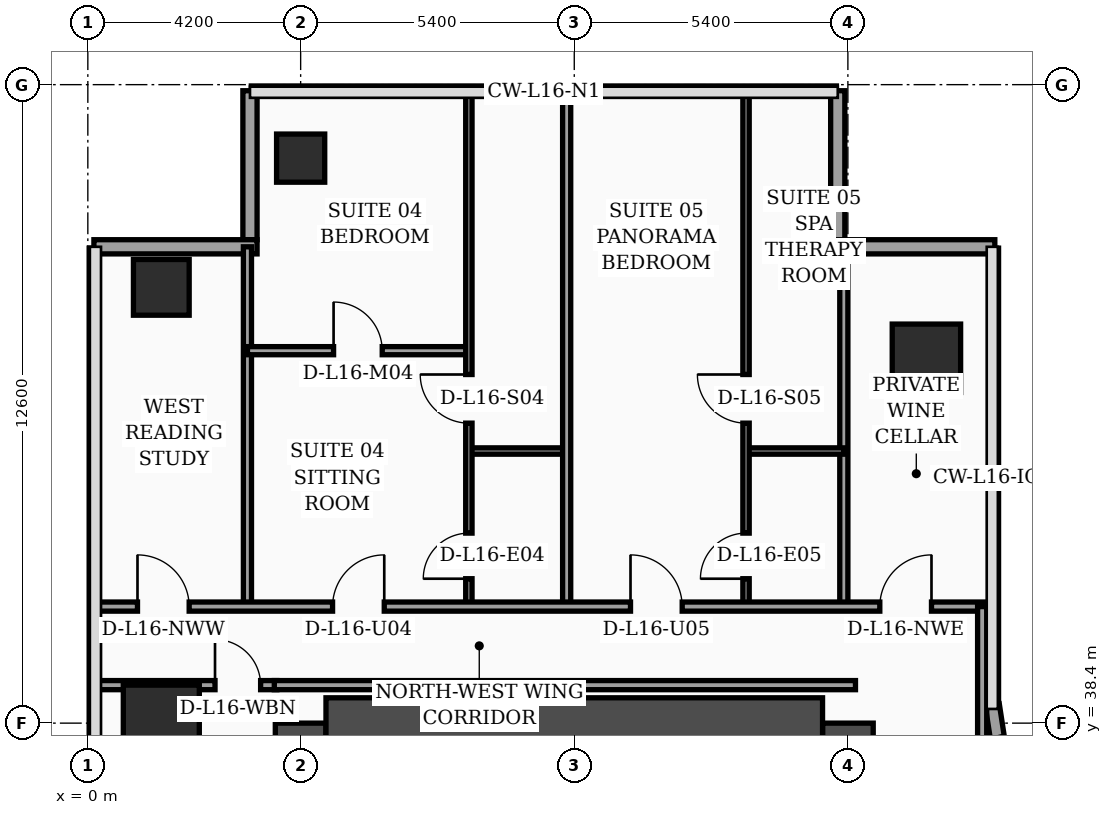
"""IFC4 building model, lengths in metres.
Left out: names, types, materials, properties, quantities, classifications, styles, units other than length and angle.
Written with IfcOpenShell. Run it as: python <this file> out.ifc"""

import sys

from ifc_helpers import new_model, si_unit, direction, frame, frame_2d, origin, origin_2d, place, context, subcontext, project, spatial, rectangle, hollow_rectangle, extrude, element, fill, save


model = new_model("IFC4")
c1 = context("Model", 3, precision=1e-05, world=origin(), true_north=direction((0.0, 1.0)))
c2 = subcontext(c1, "Body", "Model", "MODEL_VIEW")
j1 = project(units=[si_unit("LENGTHUNIT", "METRE"), si_unit("PLANEANGLEUNIT", "RADIAN")], contexts=[c1])
p1 = place(None, origin())
s1 = spatial("IfcSite", under=j1, at=p1, CompositionType="ELEMENT")
p2 = place(p1, origin())
s2 = spatial("IfcBuilding", under=s1, at=p2, CompositionType="ELEMENT")
p3 = place(p2, frame((0.0, 0.0, 69.8)))
s3 = spatial("IfcBuildingStorey", under=s2, at=p3, CompositionType="ELEMENT", Elevation=69.8)
p4 = place(p3, frame((4.2, 16.8, 0.0), z_axis=(0.0, 0.0, 1.0), x_axis=(0.0, 1.0, 0.0)))
e1 = element("IfcWall", 1, at=p4, inside=s3, PredefinedType="SHEAR", context=c2, shape_type="SweptSolid", body=[
    extrude(rectangle(XDim=21.6, YDim=1.0, at=frame_2d((10.8, 0.0))), origin(), (0.0, 0.0, 1.0), 3.56),
])
p5 = place(p3, frame((15.0, 16.8, 0.0), z_axis=(0.0, 0.0, 1.0), x_axis=(0.0, 1.0, 0.0)))
e2 = element("IfcWall", 2, at=p5, inside=s3, PredefinedType="SHEAR", context=c2, shape_type="SweptSolid", body=[
    extrude(rectangle(XDim=21.6, YDim=1.0, at=frame_2d((10.8, 0.0))), origin(), (0.0, 0.0, 1.0), 3.56),
])
p6 = place(p5, frame((8.65, 0.0, 0.0)))
e3 = element("IfcOpeningElement", 3, at=p6, cuts=e2, PredefinedType="OPENING", context=c2, shape_type="SweptSolid", body=[
    extrude(rectangle(XDim=1.1, YDim=2.2, at=frame_2d((0.55, 1.1))), frame((0.0, 0.51, 0.0), z_axis=(0.0, -1.0, 0.0), x_axis=(1.0, 0.0, 0.0)), (0.0, 0.0, 1.0), 1.02),
])
p7 = place(p5, frame((1.25, 0.0, 0.0)))
e4 = element("IfcOpeningElement", 4, at=p7, cuts=e2, PredefinedType="OPENING", context=c2, shape_type="SweptSolid", body=[
    extrude(rectangle(XDim=1.1, YDim=2.2, at=frame_2d((0.55, 1.1))), frame((0.0, 0.51, 0.0), z_axis=(0.0, -1.0, 0.0), x_axis=(1.0, 0.0, 0.0)), (0.0, 0.0, 1.0), 1.02),
])
p8 = place(p5, frame((3.8, 0.0, 0.0)))
e5 = element("IfcOpeningElement", 5, at=p8, cuts=e2, PredefinedType="OPENING", context=c2, shape_type="SweptSolid", body=[
    extrude(rectangle(XDim=1.1, YDim=2.2, at=frame_2d((0.55, 1.1))), frame((0.0, 0.51, 0.0), z_axis=(0.0, -1.0, 0.0), x_axis=(1.0, 0.0, 0.0)), (0.0, 0.0, 1.0), 1.02),
])
p9 = place(p5, frame((6.35, 0.0, 0.0)))
e6 = element("IfcOpeningElement", 6, at=p9, cuts=e2, PredefinedType="OPENING", context=c2, shape_type="SweptSolid", body=[
    extrude(rectangle(XDim=1.1, YDim=2.2, at=frame_2d((0.55, 1.1))), frame((0.0, 0.51, 0.0), z_axis=(0.0, -1.0, 0.0), x_axis=(1.0, 0.0, 0.0)), (0.0, 0.0, 1.0), 1.02),
])
p10 = place(p3, frame((4.7, 38.4, 0.0), z_axis=(0.0, 0.0, 1.0), x_axis=(1.0, 0.0, 0.0)))
e7 = element("IfcWall", 7, at=p10, inside=s3, PredefinedType="SHEAR", context=c2, shape_type="SweptSolid", body=[
    extrude(rectangle(XDim=9.8, YDim=1.0, at=frame_2d((4.9, 0.0))), origin(), (0.0, 0.0, 1.0), 3.56),
])
p11 = place(p3, frame((1.45, 38.4, 0.0), z_axis=(0.0, 0.0, 1.0), x_axis=(1.0, 0.0, 0.0)))
e8 = element("IfcColumn", 8, at=p11, inside=s3, PredefinedType="COLUMN", context=c2, shape_type="SweptSolid", body=[
    extrude(rectangle(XDim=1.5, YDim=1.5, at=origin_2d()), origin(), (0.0, 0.0, 1.0), 3.56),
])
p12 = place(p3, frame((1.45, 47.0, 0.0), z_axis=(0.0, 0.0, 1.0), x_axis=(1.0, 0.0, 0.0)))
e9 = element("IfcColumn", 9, at=p12, inside=s3, PredefinedType="COLUMN", context=c2, shape_type="SweptSolid", body=[
    extrude(hollow_rectangle(XDim=1.1, YDim=1.1, WallThickness=0.045, at=origin_2d()), origin(), (0.0, 0.0, 1.0), 3.56),
])
p13 = place(p3, frame((4.2, 49.55, 0.0), z_axis=(0.0, 0.0, 1.0), x_axis=(1.0, 0.0, 0.0)))
e10 = element("IfcColumn", 10, at=p13, inside=s3, PredefinedType="COLUMN", context=c2, shape_type="SweptSolid", body=[
    extrude(hollow_rectangle(XDim=0.95, YDim=0.95, WallThickness=0.04, at=origin_2d()), origin(), (0.0, 0.0, 1.0), 3.56),
])
p14 = place(p3, frame((16.55, 45.6, 0.0), z_axis=(0.0, 0.0, 1.0), x_axis=(1.0, 0.0, 0.0)))
e11 = element("IfcColumn", 11, at=p14, inside=s3, PredefinedType="COLUMN", context=c2, shape_type="SweptSolid", body=[
    extrude(rectangle(XDim=1.35, YDim=1.35, at=origin_2d()), origin(), (0.0, 0.0, 1.0), 3.56),
])
p15 = place(p3, frame((17.962, 38.03, 0.0), z_axis=(0.0, 0.0, 1.0), x_axis=(-0.15141125477, 0.988470855377, 0.0)))
e12 = element("IfcWall", 12, at=p15, inside=s3, PredefinedType="SOLIDWALL", context=c2, shape_type="SweptSolid", body=[
    extrude(rectangle(XDim=0.739, YDim=0.28, at=frame_2d((0.369, 0.0))), origin(), (0.0, 0.0, 1.0), 3.56),
])
p16 = place(p3, frame((17.9, 47.8, 0.0), z_axis=(0.0, 0.0, 1.0), x_axis=(-1.0, 0.0, 0.0)))
e13 = element("IfcWall", 13, at=p16, inside=s3, PredefinedType="SOLIDWALL", context=c2, shape_type="SweptSolid", body=[
    extrude(rectangle(XDim=3.24, YDim=0.28, at=frame_2d((1.62, 0.0))), origin(), (0.0, 0.0, 1.0), 3.56),
])
p17 = place(p3, frame((14.8, 47.94, 0.0), z_axis=(0.0, 0.0, 1.0), x_axis=(0.0, 1.0, 0.0)))
e14 = element("IfcWall", 14, at=p17, inside=s3, PredefinedType="SOLIDWALL", context=c2, shape_type="SweptSolid", body=[
    extrude(rectangle(XDim=2.94, YDim=0.28, at=frame_2d((1.47, 0.0))), origin(), (0.0, 0.0, 1.0), 3.56),
])
p18 = place(p3, frame((3.2, 50.88, 0.0), z_axis=(0.0, 0.0, 1.0), x_axis=(0.0, -1.0, 0.0)))
e15 = element("IfcWall", 15, at=p18, inside=s3, PredefinedType="SOLIDWALL", context=c2, shape_type="SweptSolid", body=[
    extrude(rectangle(XDim=2.94, YDim=0.28, at=frame_2d((1.47, 0.0))), origin(), (0.0, 0.0, 1.0), 3.04),
])
p19 = place(p3, frame((3.34, 47.8, 0.0), z_axis=(0.0, 0.0, 1.0), x_axis=(-1.0, 0.0, 0.0)))
e16 = element("IfcWall", 16, at=p19, inside=s3, PredefinedType="SOLIDWALL", context=c2, shape_type="SweptSolid", body=[
    extrude(rectangle(XDim=3.22, YDim=0.28, at=frame_2d((1.61, 0.0))), origin(), (0.0, 0.0, 1.0), 3.04),
])
p20 = place(p3, frame((0.08, 39.15, 0.0), z_axis=(0.0, 0.0, 1.0), x_axis=(1.0, 0.0, 0.0)))
e17 = element("IfcWall", 17, at=p20, inside=s3, PredefinedType="PARTITIONING", context=c2, shape_type="SweptSolid", body=[
    extrude(rectangle(XDim=3.65, YDim=0.18, at=frame_2d((1.825, 0.0))), origin(), (0.0, 0.0, 1.0), 2.84),
])
p21 = place(p20, frame((2.43, 0.0, 0.0)))
e18 = element("IfcOpeningElement", 18, at=p21, cuts=e17, PredefinedType="OPENING", context=c2, shape_type="SweptSolid", body=[
    extrude(rectangle(XDim=0.9, YDim=2.15, at=frame_2d((0.45, 1.075))), frame((0.0, 0.1, 0.0), z_axis=(0.0, -1.0, 0.0), x_axis=(1.0, 0.0, 0.0)), (0.0, 0.0, 1.0), 0.2),
])
p22 = place(p3, frame((3.15, 40.7, 0.0), z_axis=(0.0, 0.0, 1.0), x_axis=(0.0, 1.0, 0.0)))
e19 = element("IfcWall", 19, at=p22, inside=s3, PredefinedType="PARTITIONING", context=c2, shape_type="SweptSolid", body=[
    extrude(rectangle(XDim=7.1, YDim=0.16, at=frame_2d((3.55, 0.0))), origin(), (0.0, 0.0, 1.0), 3.14),
])
p23 = place(p3, frame((14.92, 40.7, 0.0), z_axis=(0.0, 0.0, 1.0), x_axis=(0.0, 1.0, 0.0)))
e20 = element("IfcWall", 20, at=p23, inside=s3, PredefinedType="PARTITIONING", context=c2, shape_type="SweptSolid", body=[
    extrude(rectangle(XDim=7.1, YDim=0.16, at=frame_2d((3.55, 0.0))), origin(), (0.0, 0.0, 1.0), 3.04),
])
p24 = place(p3, frame((7.52, 43.77, 0.0), z_axis=(0.0, 0.0, 1.0), x_axis=(1.0, 0.0, 0.0)))
e21 = element("IfcWall", 21, at=p24, inside=s3, PredefinedType="PARTITIONING", context=c2, shape_type="SweptSolid", body=[
    extrude(rectangle(XDim=1.93, YDim=0.125, at=frame_2d((0.965, 0.0))), origin(), (0.0, 0.0, 1.0), 3.56),
])
p25 = place(p3, frame((3.15, 45.75, 0.0), z_axis=(0.0, 0.0, 1.0), x_axis=(1.0, 0.0, 0.0)))
e22 = element("IfcWall", 22, at=p25, inside=s3, PredefinedType="PARTITIONING", context=c2, shape_type="SweptSolid", body=[
    extrude(rectangle(XDim=4.37, YDim=0.16, at=frame_2d((2.185, 0.0))), origin(), (0.0, 0.0, 1.0), 2.84),
])
p26 = place(p25, frame((1.7, 0.0, 0.0)))
e23 = element("IfcOpeningElement", 23, at=p26, cuts=e22, PredefinedType="OPENING", context=c2, shape_type="SweptSolid", body=[
    extrude(rectangle(XDim=0.96, YDim=2.2, at=frame_2d((0.48, 1.1))), frame((0.0, 0.09, 0.0), z_axis=(0.0, -1.0, 0.0), x_axis=(1.0, 0.0, 0.0)), (0.0, 0.0, 1.0), 0.18),
])
p27 = place(p3, frame((7.52, 40.7, 0.0), z_axis=(0.0, 0.0, 1.0), x_axis=(0.0, 1.0, 0.0)))
e24 = element("IfcWall", 24, at=p27, inside=s3, PredefinedType="PARTITIONING", context=c2, shape_type="SweptSolid", body=[
    extrude(rectangle(XDim=10.24, YDim=0.125, at=frame_2d((5.12, 0.0))), origin(), (0.0, 0.0, 1.0), 3.04),
])
p28 = place(p27, frame((0.55, 0.0, 0.0)))
e25 = element("IfcOpeningElement", 25, at=p28, cuts=e24, PredefinedType="OPENING", context=c2, shape_type="SweptSolid", body=[
    extrude(rectangle(XDim=0.9, YDim=2.15, at=frame_2d((0.45, 1.075))), frame((0.0, 0.073, 0.0), z_axis=(0.0, -1.0, 0.0), x_axis=(1.0, 0.0, 0.0)), (0.0, 0.0, 1.0), 0.145),
])
p29 = place(p27, frame((3.62, 0.0, 0.0)))
e26 = element("IfcOpeningElement", 26, at=p29, cuts=e24, PredefinedType="OPENING", context=c2, shape_type="SweptSolid", body=[
    extrude(rectangle(XDim=0.96, YDim=2.2, at=frame_2d((0.48, 1.1))), frame((0.0, 0.073, 0.0), z_axis=(0.0, -1.0, 0.0), x_axis=(1.0, 0.0, 0.0)), (0.0, 0.0, 1.0), 0.145),
])
p30 = place(p3, frame((12.99, 43.77, 0.0), z_axis=(0.0, 0.0, 1.0), x_axis=(1.0, 0.0, 0.0)))
e27 = element("IfcWall", 27, at=p30, inside=s3, PredefinedType="PARTITIONING", context=c2, shape_type="SweptSolid", body=[
    extrude(rectangle(XDim=1.93, YDim=0.125, at=frame_2d((0.965, 0.0))), origin(), (0.0, 0.0, 1.0), 3.56),
])
p31 = place(p3, frame((12.99, 40.7, 0.0), z_axis=(0.0, 0.0, 1.0), x_axis=(0.0, 1.0, 0.0)))
e28 = element("IfcWall", 28, at=p31, inside=s3, PredefinedType="PARTITIONING", context=c2, shape_type="SweptSolid", body=[
    extrude(rectangle(XDim=10.24, YDim=0.125, at=frame_2d((5.12, 0.0))), origin(), (0.0, 0.0, 1.0), 3.04),
])
p32 = place(p31, frame((0.55, 0.0, 0.0)))
e29 = element("IfcOpeningElement", 29, at=p32, cuts=e28, PredefinedType="OPENING", context=c2, shape_type="SweptSolid", body=[
    extrude(rectangle(XDim=0.9, YDim=2.15, at=frame_2d((0.45, 1.075))), frame((0.0, 0.073, 0.0), z_axis=(0.0, -1.0, 0.0), x_axis=(1.0, 0.0, 0.0)), (0.0, 0.0, 1.0), 0.145),
])
p33 = place(p31, frame((3.62, 0.0, 0.0)))
e30 = element("IfcOpeningElement", 30, at=p33, cuts=e28, PredefinedType="OPENING", context=c2, shape_type="SweptSolid", body=[
    extrude(rectangle(XDim=0.96, YDim=2.2, at=frame_2d((0.48, 1.1))), frame((0.0, 0.073, 0.0), z_axis=(0.0, -1.0, 0.0), x_axis=(1.0, 0.0, 0.0)), (0.0, 0.0, 1.0), 0.145),
])
p34 = place(p3, frame((9.45, 40.7, 0.0), z_axis=(0.0, 0.0, 1.0), x_axis=(0.0, 1.0, 0.0)))
e31 = element("IfcWall", 31, at=p34, inside=s3, PredefinedType="PARTITIONING", context=c2, shape_type="SweptSolid", body=[
    extrude(rectangle(XDim=10.24, YDim=0.16, at=frame_2d((5.12, 0.0))), origin(), (0.0, 0.0, 1.0), 3.04),
])
p35 = place(p3, frame((0.08, 40.7, 0.0), z_axis=(0.0, 0.0, 1.0), x_axis=(1.0, 0.0, 0.0)))
e32 = element("IfcWall", 32, at=p35, inside=s3, PredefinedType="PARTITIONING", context=c2, shape_type="SweptSolid", body=[
    extrude(rectangle(XDim=17.77, YDim=0.18, at=frame_2d((8.885, 0.0))), origin(), (0.0, 0.0, 1.0), 2.84),
])
p36 = place(p35, frame((0.9, 0.0, 0.0)))
e33 = element("IfcOpeningElement", 33, at=p36, cuts=e32, PredefinedType="OPENING", context=c2, shape_type="SweptSolid", body=[
    extrude(rectangle(XDim=1.02, YDim=2.2, at=frame_2d((0.51, 1.1))), frame((0.0, 0.1, 0.0), z_axis=(0.0, -1.0, 0.0), x_axis=(1.0, 0.0, 0.0)), (0.0, 0.0, 1.0), 0.2),
])
p37 = place(p35, frame((4.75, 0.0, 0.0)))
e34 = element("IfcOpeningElement", 34, at=p37, cuts=e32, PredefinedType="OPENING", context=c2, shape_type="SweptSolid", body=[
    extrude(rectangle(XDim=1.02, YDim=2.2, at=frame_2d((0.51, 1.1))), frame((0.0, 0.1, 0.0), z_axis=(0.0, -1.0, 0.0), x_axis=(1.0, 0.0, 0.0)), (0.0, 0.0, 1.0), 0.2),
])
p38 = place(p35, frame((10.63, 0.0, 0.0)))
e35 = element("IfcOpeningElement", 35, at=p38, cuts=e32, PredefinedType="OPENING", context=c2, shape_type="SweptSolid", body=[
    extrude(rectangle(XDim=1.02, YDim=2.2, at=frame_2d((0.51, 1.1))), frame((0.0, 0.1, 0.0), z_axis=(0.0, -1.0, 0.0), x_axis=(1.0, 0.0, 0.0)), (0.0, 0.0, 1.0), 0.2),
])
p39 = place(p35, frame((15.55, 0.0, 0.0)))
e36 = element("IfcOpeningElement", 36, at=p39, cuts=e32, PredefinedType="OPENING", context=c2, shape_type="SweptSolid", body=[
    extrude(rectangle(XDim=1.02, YDim=2.2, at=frame_2d((0.51, 1.1))), frame((0.0, 0.1, 0.0), z_axis=(0.0, -1.0, 0.0), x_axis=(1.0, 0.0, 0.0)), (0.0, 0.0, 1.0), 0.2),
])
p40 = place(p3, frame((17.65, 24.3, 0.0), z_axis=(0.0, 0.0, 1.0), x_axis=(0.0, 1.0, 0.0)))
e37 = element("IfcWall", 37, at=p40, inside=s3, PredefinedType="PARTITIONING", context=c2, shape_type="SweptSolid", body=[
    extrude(rectangle(XDim=16.4, YDim=0.18, at=frame_2d((8.2, 0.0))), origin(), (0.0, 0.0, 1.0), 2.84),
])
p41 = place(p3, frame((3.68, 39.15, 0.0), z_axis=(0.0, 0.0, 1.0), x_axis=(1.0, 0.0, 0.0)))
e38 = element("IfcWall", 38, at=p41, inside=s3, PredefinedType="PARTITIONING", context=c2, shape_type="SweptSolid", body=[
    extrude(rectangle(XDim=11.47, YDim=0.18, at=frame_2d((5.735, 0.0))), origin(), (0.0, 0.0, 1.0), 2.84),
])
p42 = place(p21, origin())
e39 = element("IfcDoor", 39, at=p42, inside=s3, OperationType="SINGLE_SWING_LEFT", PredefinedType="DOOR", context=c2, shape_type="SweptSolid", body=[
    extrude(rectangle(XDim=0.9, YDim=2.15, at=frame_2d((0.45, 1.075))), frame((0.0, 0.025, 0.0), z_axis=(0.0, -1.0, 0.0), x_axis=(1.0, 0.0, 0.0)), (0.0, 0.0, 1.0), 0.05),
])
fill(e18, e39)
p43 = place(p26, origin())
e40 = element("IfcDoor", 40, at=p43, inside=s3, OperationType="SINGLE_SWING_LEFT", PredefinedType="DOOR", context=c2, shape_type="SweptSolid", body=[
    extrude(rectangle(XDim=0.96, YDim=2.2, at=frame_2d((0.48, 1.1))), frame((0.0, 0.025, 0.0), z_axis=(0.0, -1.0, 0.0), x_axis=(1.0, 0.0, 0.0)), (0.0, 0.0, 1.0), 0.05),
])
fill(e23, e40)
p44 = place(p28, origin())
e41 = element("IfcDoor", 41, at=p44, inside=s3, OperationType="SINGLE_SWING_LEFT", PredefinedType="DOOR", context=c2, shape_type="SweptSolid", body=[
    extrude(rectangle(XDim=0.9, YDim=2.15, at=frame_2d((0.45, 1.075))), frame((0.0, 0.025, 0.0), z_axis=(0.0, -1.0, 0.0), x_axis=(1.0, 0.0, 0.0)), (0.0, 0.0, 1.0), 0.05),
])
fill(e25, e41)
p45 = place(p29, origin())
e42 = element("IfcDoor", 42, at=p45, inside=s3, OperationType="SINGLE_SWING_RIGHT", PredefinedType="DOOR", context=c2, shape_type="SweptSolid", body=[
    extrude(rectangle(XDim=0.96, YDim=2.2, at=frame_2d((0.48, 1.1))), frame((0.0, 0.025, 0.0), z_axis=(0.0, -1.0, 0.0), x_axis=(1.0, 0.0, 0.0)), (0.0, 0.0, 1.0), 0.05),
])
fill(e26, e42)
p46 = place(p32, origin())
e43 = element("IfcDoor", 43, at=p46, inside=s3, OperationType="SINGLE_SWING_LEFT", PredefinedType="DOOR", context=c2, shape_type="SweptSolid", body=[
    extrude(rectangle(XDim=0.9, YDim=2.15, at=frame_2d((0.45, 1.075))), frame((0.0, 0.025, 0.0), z_axis=(0.0, -1.0, 0.0), x_axis=(1.0, 0.0, 0.0)), (0.0, 0.0, 1.0), 0.05),
])
fill(e29, e43)
p47 = place(p33, origin())
e44 = element("IfcDoor", 44, at=p47, inside=s3, OperationType="SINGLE_SWING_RIGHT", PredefinedType="DOOR", context=c2, shape_type="SweptSolid", body=[
    extrude(rectangle(XDim=0.96, YDim=2.2, at=frame_2d((0.48, 1.1))), frame((0.0, 0.025, 0.0), z_axis=(0.0, -1.0, 0.0), x_axis=(1.0, 0.0, 0.0)), (0.0, 0.0, 1.0), 0.05),
])
fill(e30, e44)
p48 = place(p36, origin())
e45 = element("IfcDoor", 45, at=p48, inside=s3, OperationType="SINGLE_SWING_LEFT", PredefinedType="DOOR", context=c2, shape_type="SweptSolid", body=[
    extrude(rectangle(XDim=1.02, YDim=2.2, at=frame_2d((0.51, 1.1))), frame((0.0, 0.025, 0.0), z_axis=(0.0, -1.0, 0.0), x_axis=(1.0, 0.0, 0.0)), (0.0, 0.0, 1.0), 0.05),
])
fill(e33, e45)
p49 = place(p37, origin())
e46 = element("IfcDoor", 46, at=p49, inside=s3, OperationType="SINGLE_SWING_RIGHT", PredefinedType="DOOR", context=c2, shape_type="SweptSolid", body=[
    extrude(rectangle(XDim=1.02, YDim=2.2, at=frame_2d((0.51, 1.1))), frame((0.0, 0.025, 0.0), z_axis=(0.0, -1.0, 0.0), x_axis=(1.0, 0.0, 0.0)), (0.0, 0.0, 1.0), 0.05),
])
fill(e34, e46)
p50 = place(p38, origin())
e47 = element("IfcDoor", 47, at=p50, inside=s3, OperationType="SINGLE_SWING_LEFT", PredefinedType="DOOR", context=c2, shape_type="SweptSolid", body=[
    extrude(rectangle(XDim=1.02, YDim=2.2, at=frame_2d((0.51, 1.1))), frame((0.0, 0.025, 0.0), z_axis=(0.0, -1.0, 0.0), x_axis=(1.0, 0.0, 0.0)), (0.0, 0.0, 1.0), 0.05),
])
fill(e35, e47)
p51 = place(p39, origin())
e48 = element("IfcDoor", 48, at=p51, inside=s3, OperationType="SINGLE_SWING_RIGHT", PredefinedType="DOOR", context=c2, shape_type="SweptSolid", body=[
    extrude(rectangle(XDim=1.02, YDim=2.2, at=frame_2d((0.51, 1.1))), frame((0.0, 0.025, 0.0), z_axis=(0.0, -1.0, 0.0), x_axis=(1.0, 0.0, 0.0)), (0.0, 0.0, 1.0), 0.05),
])
fill(e36, e48)
save(model, sys.argv[1])
